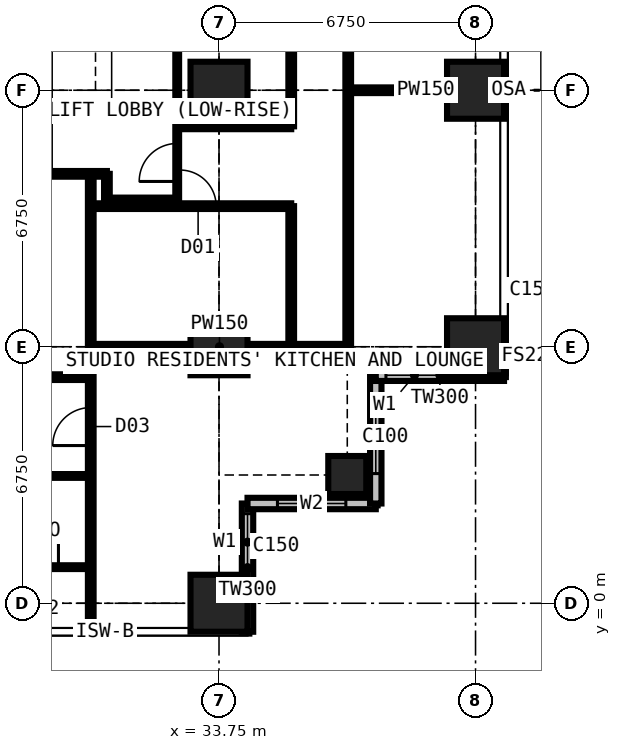
"""IFC4 building model, lengths in metres.
Left out: names, types, materials, properties, quantities, classifications, styles, units other than length and angle.
Written with IfcOpenShell. Run it as: python <this file> out.ifc"""

import sys

from ifc_helpers import new_model, si_unit, direction, frame, frame_2d, origin, origin_2d, place, context, subcontext, project, spatial, rectangle, extrude, element, fill, save


model = new_model("IFC4")
c1 = context("Model", 3, precision=1e-05, world=origin(), true_north=direction((0.0, 1.0)))
c2 = subcontext(c1, "Body", "Model", "MODEL_VIEW")
j1 = project(units=[si_unit("LENGTHUNIT", "METRE"), si_unit("PLANEANGLEUNIT", "RADIAN")], contexts=[c1])
p1 = place(None, origin())
s1 = spatial("IfcSite", under=j1, at=p1, CompositionType="ELEMENT")
p2 = place(p1, origin())
s2 = spatial("IfcBuilding", under=s1, at=p2, CompositionType="ELEMENT")
p3 = place(p2, frame((0.0, 0.0, 119.7)))
s3 = spatial("IfcBuildingStorey", under=s2, at=p3, CompositionType="ELEMENT", Elevation=119.7)
for number, where, z_axis, x_axis in (
    (1, (33.75, 0.0, 0.0), (0.0, 0.0, 1.0), (1.0, 0.0, 0.0)),
    (2, (33.75, 6.75, 0.0), (0.0, 0.0, 1.0), (1.0, 0.0, 0.0)),
    (3, (33.75, 13.5, 0.0), (0.0, 0.0, 1.0), (1.0, 0.0, 0.0)),
):
    element("IfcColumn", number, at=place(p3, frame(where, z_axis=z_axis, x_axis=x_axis)), inside=s3, PredefinedType="COLUMN", context=c2, shape_type="SweptSolid", body=[
        extrude(rectangle(XDim=1.5, YDim=1.5, at=origin_2d()), origin(), (0.0, 0.0, 1.0), 3.6),
    ])
p4 = place(p3, frame((37.125, 3.375, 0.0), z_axis=(0.0, 0.0, 1.0), x_axis=(1.0, 0.0, 0.0)))
e4 = element("IfcColumn", 4, at=p4, inside=s3, PredefinedType="COLUMN", context=c2, shape_type="SweptSolid", body=[
    extrude(rectangle(XDim=1.0, YDim=1.0, at=origin_2d()), origin(), (0.0, 0.0, 1.0), 3.6),
])
for number, where, z_axis, x_axis in (
    (5, (40.5, 6.75, 0.0), (0.0, 0.0, 1.0), (1.0, 0.0, 0.0)),
    (6, (40.5, 13.5, 0.0), (0.0, 0.0, 1.0), (1.0, 0.0, 0.0)),
):
    element("IfcColumn", number, at=place(p3, frame(where, z_axis=z_axis, x_axis=x_axis)), inside=s3, PredefinedType="COLUMN", context=c2, shape_type="SweptSolid", body=[
        extrude(rectangle(XDim=1.5, YDim=1.5, at=origin_2d()), origin(), (0.0, 0.0, 1.0), 3.6),
    ])
p5 = place(p3, frame((34.5, -0.75, 0.0), z_axis=(0.0, 0.0, 1.0), x_axis=(0.0, 1.0, 0.0)))
e7 = element("IfcWall", 7, at=p5, inside=s3, PredefinedType="SOLIDWALL", context=c2, shape_type="SweptSolid", body=[
    extrude(rectangle(XDim=3.375, YDim=0.3, at=frame_2d((1.688, 0.0))), origin(), (0.0, 0.0, 1.0), 3.375),
])
p6 = place(p5, frame((1.607, 0.0, 0.9)))
e8 = element("IfcOpeningElement", 8, at=p6, cuts=e7, PredefinedType="OPENING", context=c2, shape_type="SweptSolid", body=[
    extrude(rectangle(XDim=1.5, YDim=1.8, at=frame_2d((0.75, 0.9))), frame((0.0, 0.16, 0.0), z_axis=(0.0, -1.0, 0.0), x_axis=(1.0, 0.0, 0.0)), (0.0, 0.0, 1.0), 0.32),
])
p7 = place(p3, frame((34.5, 2.625, 0.0), z_axis=(0.0, 0.0, 1.0), x_axis=(1.0, 0.0, 0.0)))
e9 = element("IfcWall", 9, at=p7, inside=s3, PredefinedType="SOLIDWALL", context=c2, shape_type="SweptSolid", body=[
    extrude(rectangle(XDim=3.375, YDim=0.3, at=frame_2d((1.688, 0.0))), origin(), (0.0, 0.0, 1.0), 3.375),
])
p8 = place(p7, frame((0.788, 0.0, 0.6)))
e10 = element("IfcOpeningElement", 10, at=p8, cuts=e9, PredefinedType="OPENING", context=c2, shape_type="SweptSolid", body=[
    extrude(rectangle(XDim=1.8, YDim=2.1, at=frame_2d((0.9, 1.05))), frame((0.0, 0.16, 0.0), z_axis=(0.0, -1.0, 0.0), x_axis=(1.0, 0.0, 0.0)), (0.0, 0.0, 1.0), 0.32),
])
p9 = place(p3, frame((37.875, 2.625, 0.0), z_axis=(0.0, 0.0, 1.0), x_axis=(0.0, 1.0, 0.0)))
e11 = element("IfcWall", 11, at=p9, inside=s3, PredefinedType="SOLIDWALL", context=c2, shape_type="SweptSolid", body=[
    extrude(rectangle(XDim=3.375, YDim=0.3, at=frame_2d((1.688, 0.0))), origin(), (0.0, 0.0, 1.0), 3.375),
])
p10 = place(p9, frame((0.788, 0.0, 0.6)))
e12 = element("IfcOpeningElement", 12, at=p10, cuts=e11, PredefinedType="OPENING", context=c2, shape_type="SweptSolid", body=[
    extrude(rectangle(XDim=1.8, YDim=2.1, at=frame_2d((0.9, 1.05))), frame((0.0, 0.16, 0.0), z_axis=(0.0, -1.0, 0.0), x_axis=(1.0, 0.0, 0.0)), (0.0, 0.0, 1.0), 0.32),
])
p11 = place(p3, frame((37.875, 6.0, 0.0), z_axis=(0.0, 0.0, 1.0), x_axis=(1.0, 0.0, 0.0)))
e13 = element("IfcWall", 13, at=p11, inside=s3, PredefinedType="SOLIDWALL", context=c2, shape_type="SweptSolid", body=[
    extrude(rectangle(XDim=3.375, YDim=0.3, at=frame_2d((1.688, 0.0))), origin(), (0.0, 0.0, 1.0), 3.375),
])
p12 = place(p11, frame((0.268, 0.0, 0.9)))
e14 = element("IfcOpeningElement", 14, at=p12, cuts=e13, PredefinedType="OPENING", context=c2, shape_type="SweptSolid", body=[
    extrude(rectangle(XDim=1.5, YDim=1.8, at=frame_2d((0.75, 0.9))), frame((0.0, 0.16, 0.0), z_axis=(0.0, -1.0, 0.0), x_axis=(1.0, 0.0, 0.0)), (0.0, 0.0, 1.0), 0.32),
])
p13 = place(p3, frame((6.75, 3.35, 0.0), z_axis=(0.0, 0.0, 1.0), x_axis=(1.0, 0.0, 0.0)))
e15 = element("IfcWall", 15, at=p13, inside=s3, PredefinedType="PARTITIONING", context=c2, shape_type="SweptSolid", body=[
    extrude(rectangle(XDim=23.625, YDim=0.1, at=frame_2d((11.812, 0.0))), origin(), (0.0, 0.0, 1.0), 3.375),
])
p14 = place(p13, frame((1.2, 0.0, 0.0)))
e16 = element("IfcOpeningElement", 16, at=p14, cuts=e15, PredefinedType="OPENING", context=c2, shape_type="SweptSolid", body=[
    extrude(rectangle(XDim=1.0, YDim=2.2, at=frame_2d((0.5, 1.1))), frame((0.0, 0.06, 0.0), z_axis=(0.0, -1.0, 0.0), x_axis=(1.0, 0.0, 0.0)), (0.0, 0.0, 1.0), 0.12),
])
p15 = place(p13, frame((3.575, 0.0, 0.0)))
e17 = element("IfcOpeningElement", 17, at=p15, cuts=e15, PredefinedType="OPENING", context=c2, shape_type="SweptSolid", body=[
    extrude(rectangle(XDim=0.95, YDim=2.2, at=frame_2d((0.475, 1.1))), frame((0.0, 0.06, 0.0), z_axis=(0.0, -1.0, 0.0), x_axis=(1.0, 0.0, 0.0)), (0.0, 0.0, 1.0), 0.12),
])
p16 = place(p13, frame((6.95, 0.0, 0.0)))
e18 = element("IfcOpeningElement", 18, at=p16, cuts=e15, PredefinedType="OPENING", context=c2, shape_type="SweptSolid", body=[
    extrude(rectangle(XDim=0.95, YDim=2.2, at=frame_2d((0.475, 1.1))), frame((0.0, 0.06, 0.0), z_axis=(0.0, -1.0, 0.0), x_axis=(1.0, 0.0, 0.0)), (0.0, 0.0, 1.0), 0.12),
])
p17 = place(p13, frame((10.325, 0.0, 0.0)))
e19 = element("IfcOpeningElement", 19, at=p17, cuts=e15, PredefinedType="OPENING", context=c2, shape_type="SweptSolid", body=[
    extrude(rectangle(XDim=0.95, YDim=2.2, at=frame_2d((0.475, 1.1))), frame((0.0, 0.06, 0.0), z_axis=(0.0, -1.0, 0.0), x_axis=(1.0, 0.0, 0.0)), (0.0, 0.0, 1.0), 0.12),
])
p18 = place(p13, frame((18.475, 0.0, 0.0)))
e20 = element("IfcOpeningElement", 20, at=p18, cuts=e15, PredefinedType="OPENING", context=c2, shape_type="SweptSolid", body=[
    extrude(rectangle(XDim=0.95, YDim=2.2, at=frame_2d((0.475, 1.1))), frame((0.0, 0.06, 0.0), z_axis=(0.0, -1.0, 0.0), x_axis=(1.0, 0.0, 0.0)), (0.0, 0.0, 1.0), 0.12),
])
p19 = place(p13, frame((13.7, 0.0, 0.0)))
e21 = element("IfcOpeningElement", 21, at=p19, cuts=e15, PredefinedType="OPENING", context=c2, shape_type="SweptSolid", body=[
    extrude(rectangle(XDim=0.95, YDim=2.2, at=frame_2d((0.475, 1.1))), frame((0.0, 0.06, 0.0), z_axis=(0.0, -1.0, 0.0), x_axis=(1.0, 0.0, 0.0)), (0.0, 0.0, 1.0), 0.12),
])
p20 = place(p3, frame((10.125, 11.3, 0.0), z_axis=(0.0, 0.0, 1.0), x_axis=(1.0, 0.0, 0.0)))
e22 = element("IfcWall", 22, at=p20, inside=s3, PredefinedType="PARTITIONING", context=c2, shape_type="SweptSolid", body=[
    extrude(rectangle(XDim=20.675, YDim=0.15, at=frame_2d((10.337, 0.0))), origin(), (0.0, 0.0, 1.0), 3.375),
])
p21 = place(p20, frame((8.375, 0.0, 0.0)))
e23 = element("IfcOpeningElement", 23, at=p21, cuts=e22, PredefinedType="OPENING", context=c2, shape_type="SweptSolid", body=[
    extrude(rectangle(XDim=1.0, YDim=2.2, at=frame_2d((0.5, 1.1))), frame((0.0, 0.085, 0.0), z_axis=(0.0, -1.0, 0.0), x_axis=(1.0, 0.0, 0.0)), (0.0, 0.0, 1.0), 0.17),
])
p22 = place(p20, frame((10.975, 0.0, 0.0)))
e24 = element("IfcOpeningElement", 24, at=p22, cuts=e22, PredefinedType="OPENING", context=c2, shape_type="SweptSolid", body=[
    extrude(rectangle(XDim=1.0, YDim=2.2, at=frame_2d((0.5, 1.1))), frame((0.0, 0.085, 0.0), z_axis=(0.0, -1.0, 0.0), x_axis=(1.0, 0.0, 0.0)), (0.0, 0.0, 1.0), 0.17),
])
p23 = place(p20, frame((3.925, 0.0, 0.0)))
e25 = element("IfcOpeningElement", 25, at=p23, cuts=e22, PredefinedType="OPENING", context=c2, shape_type="SweptSolid", body=[
    extrude(rectangle(XDim=0.95, YDim=2.2, at=frame_2d((0.475, 1.1))), frame((0.0, 0.085, 0.0), z_axis=(0.0, -1.0, 0.0), x_axis=(1.0, 0.0, 0.0)), (0.0, 0.0, 1.0), 0.17),
])
p24 = place(p3, frame((27.725, 5.95, 0.0), z_axis=(0.0, 0.0, 1.0), x_axis=(1.0, 0.0, 0.0)))
e26 = element("IfcWall", 26, at=p24, inside=s3, PredefinedType="PARTITIONING", context=c2, shape_type="SweptSolid", body=[
    extrude(rectangle(XDim=2.65, YDim=0.15, at=frame_2d((1.325, 0.0))), origin(), (0.0, 0.0, 1.0), 3.375),
])
p25 = place(p3, frame((27.775, 0.95, 0.0), z_axis=(0.0, 0.0, 1.0), x_axis=(1.0, 0.0, 0.0)))
e27 = element("IfcWall", 27, at=p25, inside=s3, PredefinedType="PARTITIONING", context=c2, shape_type="SweptSolid", body=[
    extrude(rectangle(XDim=2.6, YDim=0.1, at=frame_2d((1.3, 0.0))), origin(), (0.0, 0.0, 1.0), 3.375),
])
p26 = place(p25, frame((0.85, 0.0, 0.0)))
e28 = element("IfcOpeningElement", 28, at=p26, cuts=e27, PredefinedType="OPENING", context=c2, shape_type="SweptSolid", body=[
    extrude(rectangle(XDim=0.9, YDim=2.2, at=frame_2d((0.45, 1.1))), frame((0.0, 0.06, 0.0), z_axis=(0.0, -1.0, 0.0), x_axis=(1.0, 0.0, 0.0)), (0.0, 0.0, 1.0), 0.12),
])
p27 = place(p3, frame((30.375, -0.734, 0.0), z_axis=(0.0, 0.0, 1.0), x_axis=(0.0, 1.0, 0.0)))
e29 = element("IfcWall", 29, at=p27, inside=s3, PredefinedType="PARTITIONING", context=c2, shape_type="SweptSolid", body=[
    extrude(rectangle(XDim=12.034, YDim=0.15, at=frame_2d((6.017, 0.0))), origin(), (0.0, 0.0, 1.0), 3.375),
])
p28 = place(p27, frame((4.884, 0.0, 0.0)))
e30 = element("IfcOpeningElement", 30, at=p28, cuts=e29, PredefinedType="OPENING", context=c2, shape_type="SweptSolid", body=[
    extrude(rectangle(XDim=1.0, YDim=2.2, at=frame_2d((0.5, 1.1))), frame((0.0, 0.085, 0.0), z_axis=(0.0, -1.0, 0.0), x_axis=(1.0, 0.0, 0.0)), (0.0, 0.0, 1.0), 0.17),
])
p29 = place(p3, frame((30.375, 6.75, 0.0), z_axis=(0.0, 0.0, 1.0), x_axis=(1.0, 0.0, 0.0)))
e31 = element("IfcWall", 31, at=p29, inside=s3, PredefinedType="PARTITIONING", context=c2, shape_type="SweptSolid", body=[
    extrude(rectangle(XDim=6.775, YDim=0.15, at=frame_2d((3.387, 0.0))), origin(), (0.0, 0.0, 1.0), 2.877),
])
p30 = place(p3, frame((30.375, 10.45, 0.0), z_axis=(0.0, 0.0, 1.0), x_axis=(1.0, 0.0, 0.0)))
e32 = element("IfcWall", 32, at=p30, inside=s3, PredefinedType="PARTITIONING", context=c2, shape_type="SweptSolid", body=[
    extrude(rectangle(XDim=5.275, YDim=0.15, at=frame_2d((2.637, 0.0))), origin(), (0.0, 0.0, 1.0), 3.375),
])
p31 = place(p30, frame((2.35, 0.0, 0.0)))
e33 = element("IfcOpeningElement", 33, at=p31, cuts=e32, PredefinedType="OPENING", context=c2, shape_type="SweptSolid", body=[
    extrude(rectangle(XDim=0.95, YDim=2.2, at=frame_2d((0.475, 1.1))), frame((0.0, 0.085, 0.0), z_axis=(0.0, -1.0, 0.0), x_axis=(1.0, 0.0, 0.0)), (0.0, 0.0, 1.0), 0.17),
])
p32 = place(p3, frame((30.8, 10.6, 0.0), z_axis=(0.0, 0.0, 1.0), x_axis=(0.0, 1.0, 0.0)))
e34 = element("IfcWall", 34, at=p32, inside=s3, PredefinedType="PARTITIONING", context=c2, shape_type="SweptSolid", body=[
    extrude(rectangle(XDim=0.7, YDim=0.15, at=frame_2d((0.35, 0.0))), origin(), (0.0, 0.0, 1.0), 3.375),
])
p33 = place(p3, frame((30.8, 10.6, 0.0), z_axis=(0.0, 0.0, 1.0), x_axis=(1.0, 0.0, 0.0)))
e35 = element("IfcWall", 35, at=p33, inside=s3, PredefinedType="PARTITIONING", context=c2, shape_type="SweptSolid", body=[
    extrude(rectangle(XDim=1.85, YDim=0.15, at=frame_2d((0.925, 0.0))), origin(), (0.0, 0.0, 1.0), 3.375),
])
p34 = place(p3, frame((32.65, 10.6, 0.0), z_axis=(0.0, 0.0, 1.0), x_axis=(0.0, 1.0, 0.0)))
e36 = element("IfcWall", 36, at=p34, inside=s3, PredefinedType="SHEAR", context=c2, shape_type="SweptSolid", body=[
    extrude(rectangle(XDim=9.3, YDim=0.1, at=frame_2d((4.65, 0.0))), origin(), (0.0, 0.0, 1.0), 3.375),
])
p35 = place(p34, frame((0.5, 0.0, 0.0)))
e37 = element("IfcOpeningElement", 37, at=p35, cuts=e36, PredefinedType="OPENING", context=c2, shape_type="SweptSolid", body=[
    extrude(rectangle(XDim=1.0, YDim=2.2, at=frame_2d((0.5, 1.1))), frame((0.0, 0.06, 0.0), z_axis=(0.0, -1.0, 0.0), x_axis=(1.0, 0.0, 0.0)), (0.0, 0.0, 1.0), 0.12),
])
p36 = place(p3, frame((32.65, 12.55, 0.0), z_axis=(0.0, 0.0, 1.0), x_axis=(1.0, 0.0, 0.0)))
e38 = element("IfcWall", 38, at=p36, inside=s3, PredefinedType="PARTITIONING", context=c2, shape_type="SweptSolid", body=[
    extrude(rectangle(XDim=3.0, YDim=0.15, at=frame_2d((1.5, 0.0))), origin(), (0.0, 0.0, 1.0), 3.375),
])
p37 = place(p3, frame((35.65, 6.75, 0.0), z_axis=(0.0, 0.0, 1.0), x_axis=(0.0, 1.0, 0.0)))
e39 = element("IfcWall", 39, at=p37, inside=s3, PredefinedType="PARTITIONING", context=c2, shape_type="SweptSolid", body=[
    extrude(rectangle(XDim=3.7, YDim=0.15, at=frame_2d((1.85, 0.0))), origin(), (0.0, 0.0, 1.0), 3.375),
])
p38 = place(p3, frame((35.65, 12.55, 0.0), z_axis=(0.0, 0.0, 1.0), x_axis=(0.0, 1.0, 0.0)))
e40 = element("IfcWall", 40, at=p38, inside=s3, PredefinedType="PARTITIONING", context=c2, shape_type="SweptSolid", body=[
    extrude(rectangle(XDim=15.175, YDim=0.15, at=frame_2d((7.587, 0.0))), origin(), (0.0, 0.0, 1.0), 3.375),
])
p39 = place(p38, frame((6.225, 0.0, 0.0)))
e41 = element("IfcOpeningElement", 41, at=p39, cuts=e40, PredefinedType="OPENING", context=c2, shape_type="SweptSolid", body=[
    extrude(rectangle(XDim=0.95, YDim=2.2, at=frame_2d((0.475, 1.1))), frame((0.0, 0.085, 0.0), z_axis=(0.0, -1.0, 0.0), x_axis=(1.0, 0.0, 0.0)), (0.0, 0.0, 1.0), 0.17),
])
p40 = place(p3, frame((37.15, 6.75, 0.0), z_axis=(0.0, 0.0, 1.0), x_axis=(0.0, 1.0, 0.0)))
e42 = element("IfcWall", 42, at=p40, inside=s3, PredefinedType="PARTITIONING", context=c2, shape_type="SweptSolid", body=[
    extrude(rectangle(XDim=20.25, YDim=0.15, at=frame_2d((10.125, 0.0))), origin(), (0.0, 0.0, 1.0), 3.375),
])
p41 = place(p40, frame((15.1, 0.0, 0.0)))
e43 = element("IfcOpeningElement", 43, at=p41, cuts=e42, PredefinedType="OPENING", context=c2, shape_type="SweptSolid", body=[
    extrude(rectangle(XDim=0.95, YDim=2.2, at=frame_2d((0.475, 1.1))), frame((0.0, 0.085, 0.0), z_axis=(0.0, -1.0, 0.0), x_axis=(1.0, 0.0, 0.0)), (0.0, 0.0, 1.0), 0.17),
])
p42 = place(p40, frame((8.35, 0.0, 0.0)))
e44 = element("IfcOpeningElement", 44, at=p42, cuts=e42, PredefinedType="OPENING", context=c2, shape_type="SweptSolid", body=[
    extrude(rectangle(XDim=0.95, YDim=2.2, at=frame_2d((0.475, 1.1))), frame((0.0, 0.085, 0.0), z_axis=(0.0, -1.0, 0.0), x_axis=(1.0, 0.0, 0.0)), (0.0, 0.0, 1.0), 0.17),
])
p43 = place(p3, frame((37.15, 13.5, 0.0), z_axis=(0.0, 0.0, 1.0), x_axis=(1.0, 0.0, 0.0)))
e45 = element("IfcWall", 45, at=p43, inside=s3, PredefinedType="PARTITIONING", context=c2, shape_type="SweptSolid", body=[
    extrude(rectangle(XDim=4.084, YDim=0.15, at=frame_2d((2.042, 0.0))), origin(), (0.0, 0.0, 1.0), 2.61),
])
p44 = place(p6, origin())
e46 = element("IfcWindow", 46, at=p44, inside=s3, PartitioningType="SINGLE_PANEL", PredefinedType="WINDOW", context=c2, shape_type="SweptSolid", body=[
    extrude(rectangle(XDim=1.5, YDim=1.8, at=frame_2d((0.75, 0.9))), frame((0.0, 0.03, 0.0), z_axis=(0.0, -1.0, 0.0), x_axis=(1.0, 0.0, 0.0)), (0.0, 0.0, 1.0), 0.06),
])
fill(e8, e46)
p45 = place(p8, origin())
e47 = element("IfcWindow", 47, at=p45, inside=s3, PartitioningType="SINGLE_PANEL", PredefinedType="WINDOW", context=c2, shape_type="SweptSolid", body=[
    extrude(rectangle(XDim=1.8, YDim=2.1, at=frame_2d((0.9, 1.05))), frame((0.0, 0.03, 0.0), z_axis=(0.0, -1.0, 0.0), x_axis=(1.0, 0.0, 0.0)), (0.0, 0.0, 1.0), 0.06),
])
fill(e10, e47)
p46 = place(p10, origin())
e48 = element("IfcWindow", 48, at=p46, inside=s3, PartitioningType="SINGLE_PANEL", PredefinedType="WINDOW", context=c2, shape_type="SweptSolid", body=[
    extrude(rectangle(XDim=1.8, YDim=2.1, at=frame_2d((0.9, 1.05))), frame((0.0, 0.03, 0.0), z_axis=(0.0, -1.0, 0.0), x_axis=(1.0, 0.0, 0.0)), (0.0, 0.0, 1.0), 0.06),
])
fill(e12, e48)
p47 = place(p12, origin())
e49 = element("IfcWindow", 49, at=p47, inside=s3, PartitioningType="SINGLE_PANEL", PredefinedType="WINDOW", context=c2, shape_type="SweptSolid", body=[
    extrude(rectangle(XDim=1.5, YDim=1.8, at=frame_2d((0.75, 0.9))), frame((0.0, 0.03, 0.0), z_axis=(0.0, -1.0, 0.0), x_axis=(1.0, 0.0, 0.0)), (0.0, 0.0, 1.0), 0.06),
])
fill(e14, e49)
p48 = place(p26, origin())
e50 = element("IfcDoor", 50, at=p48, inside=s3, OperationType="SINGLE_SWING_RIGHT", PredefinedType="DOOR", context=c2, shape_type="SweptSolid", body=[
    extrude(rectangle(XDim=0.9, YDim=2.2, at=frame_2d((0.45, 1.1))), frame((0.0, 0.025, 0.0), z_axis=(0.0, -1.0, 0.0), x_axis=(1.0, 0.0, 0.0)), (0.0, 0.0, 1.0), 0.05),
])
fill(e28, e50)
p49 = place(p28, origin())
e51 = element("IfcDoor", 51, at=p49, inside=s3, OperationType="SINGLE_SWING_LEFT", PredefinedType="DOOR", context=c2, shape_type="SweptSolid", body=[
    extrude(rectangle(XDim=1.0, YDim=2.2, at=frame_2d((0.5, 1.1))), frame((0.0, 0.025, 0.0), z_axis=(0.0, -1.0, 0.0), x_axis=(1.0, 0.0, 0.0)), (0.0, 0.0, 1.0), 0.05),
])
fill(e30, e51)
p50 = place(p35, origin())
e52 = element("IfcDoor", 52, at=p50, inside=s3, OperationType="SINGLE_SWING_LEFT", PredefinedType="DOOR", context=c2, shape_type="SweptSolid", body=[
    extrude(rectangle(XDim=1.0, YDim=2.2, at=frame_2d((0.5, 1.1))), frame((0.0, 0.025, 0.0), z_axis=(0.0, -1.0, 0.0), x_axis=(1.0, 0.0, 0.0)), (0.0, 0.0, 1.0), 0.05),
])
fill(e37, e52)
p51 = place(p31, origin())
e53 = element("IfcDoor", 53, at=p51, inside=s3, OperationType="SINGLE_SWING_LEFT", PredefinedType="DOOR", context=c2, shape_type="SweptSolid", body=[
    extrude(rectangle(XDim=0.95, YDim=2.2, at=frame_2d((0.475, 1.1))), frame((0.0, 0.025, 0.0), z_axis=(0.0, -1.0, 0.0), x_axis=(1.0, 0.0, 0.0)), (0.0, 0.0, 1.0), 0.05),
])
fill(e33, e53)
save(model, sys.argv[1])
